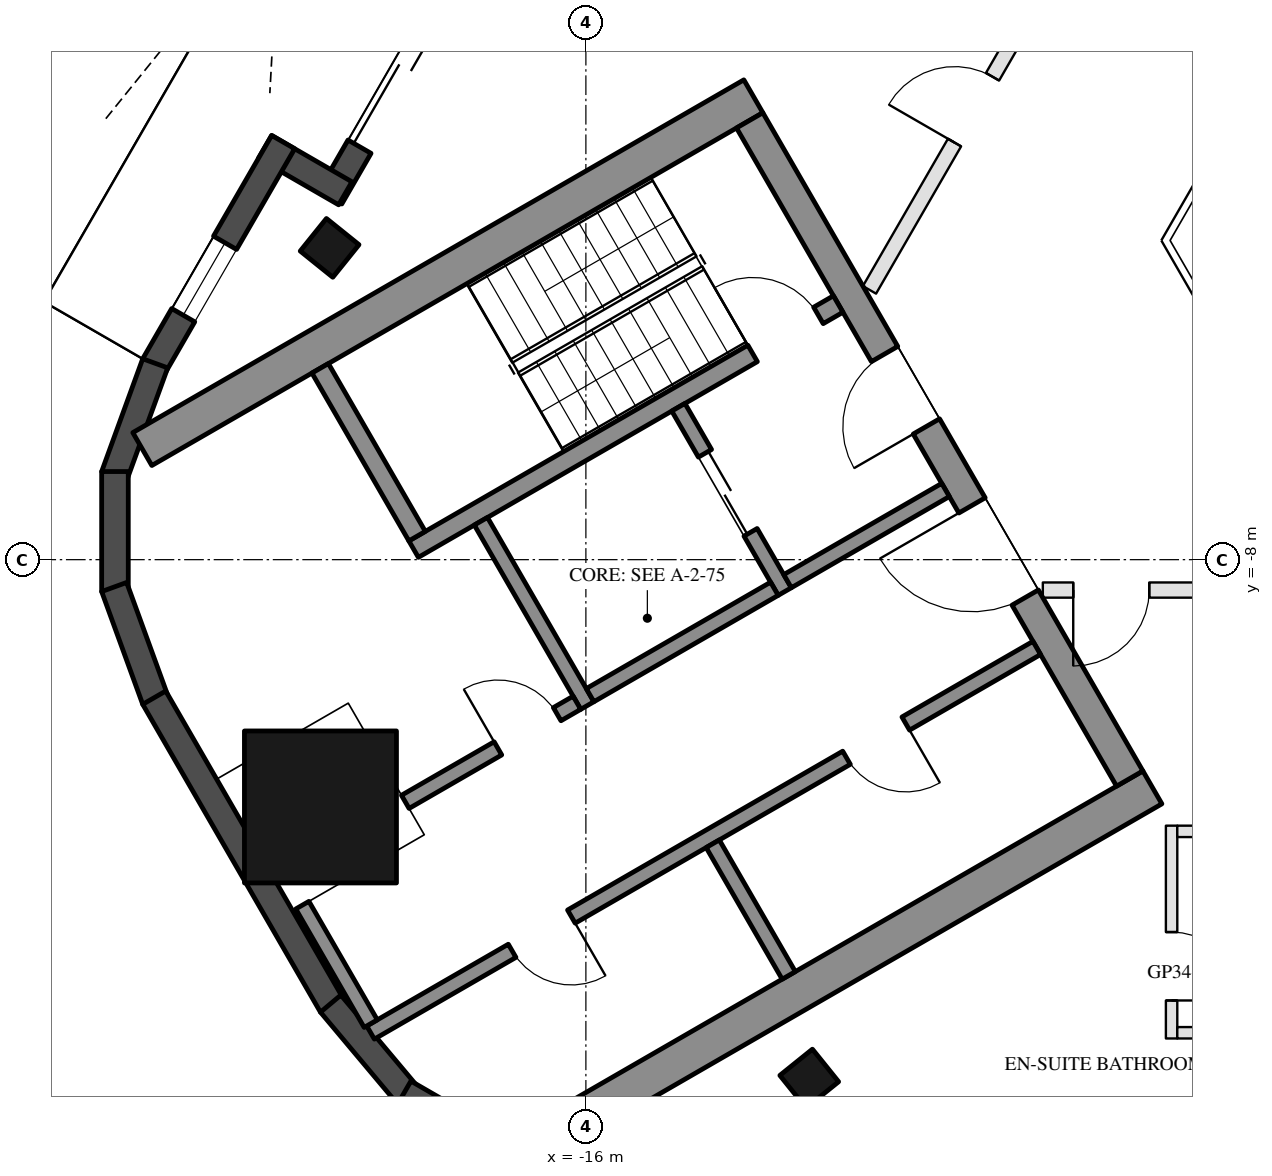
"""IFC4 building model, lengths in metres.
Left out: names, types, materials, properties, quantities, classifications, styles, units other than length and angle.
Written with IfcOpenShell. Run it as: python <this file> out.ifc"""

import sys

from ifc_helpers import new_model, si_unit, direction, frame, frame_2d, origin, origin_2d, place, context, subcontext, project, spatial, rectangle, hollow_rectangle, extrude, boolean, halfspace, element, fill, save


model = new_model("IFC4")
c1 = context("Model", 3, precision=1e-05, world=origin(), true_north=direction((0.0, 1.0)))
c2 = subcontext(c1, "Body", "Model", "MODEL_VIEW")
j1 = project(units=[si_unit("LENGTHUNIT", "METRE"), si_unit("PLANEANGLEUNIT", "RADIAN")], contexts=[c1])
p1 = place(None, origin())
s1 = spatial("IfcSite", under=j1, at=p1, CompositionType="ELEMENT")
p2 = place(p1, origin())
s2 = spatial("IfcBuilding", under=s1, at=p2, CompositionType="ELEMENT")
p3 = place(p2, frame((0.0, 0.0, 320.7)))
s3 = spatial("IfcBuildingStorey", under=s2, at=p3, CompositionType="ELEMENT", Elevation=320.7)
for number, where, z_axis, x_axis in (
    (1, (-13.061, -14.827, 0.0), (0.121, 0.15, 0.981), (-0.993, 0.009, 0.121)),
    (2, (-19.372, -3.898, 0.0), (0.191, 0.03, 0.981), (-0.488, -0.864, 0.121)),
):
    element("IfcColumn", number, at=place(p3, frame(where, z_axis=z_axis, x_axis=x_axis)), inside=s3, PredefinedType="COLUMN", context=c2, shape_type="SweptSolid", body=[
        boolean("DIFFERENCE", boolean("DIFFERENCE", extrude(hollow_rectangle(XDim=0.55, YDim=0.55, WallThickness=0.025, at=origin_2d()), origin(), (0.0, 0.0, 1.0), 3.771), halfspace(frame((0.0, 0.0, 0.04), z_axis=(0.0, 0.0, 1.0), x_axis=(1.0, 0.0, 0.0)), True)), halfspace(frame((0.0, 0.0, 3.731), z_axis=(0.0, 0.0, 1.0), x_axis=(1.0, 0.0, 0.0)), False)),
    ])
p4 = place(p3, frame((-19.492, -11.254, 0.0), z_axis=(0.190406849863, 0.109944185114, 0.975529347424), x_axis=(-0.500043453909, 0.866000314205, 0.0)))
e3 = element("IfcColumn", 3, at=p4, inside=s3, PredefinedType="COLUMN", context=c2, shape_type="SweptSolid", body=[
    boolean("DIFFERENCE", boolean("DIFFERENCE", extrude(hollow_rectangle(XDim=2.0, YDim=2.0, WallThickness=0.05, at=origin_2d()), origin(), (0.0, 0.0, 1.0), 3.793), halfspace(frame((0.0, 0.0, 0.113), z_axis=(0.0, 0.0, 1.0), x_axis=(1.0, 0.0, 0.0)), True)), halfspace(frame((0.0, 0.0, 3.679), z_axis=(0.0, 0.0, 1.0), x_axis=(1.0, 0.0, 0.0)), False)),
])
p5 = place(p3, frame((-16.678, 1.418, 0.0), z_axis=(0.0, 0.0, 1.0), x_axis=(-0.499996591357, -0.866027371756, 0.0)))
e4 = element("IfcWall", 4, at=p5, inside=s3, PredefinedType="SOLIDWALL", context=c2, shape_type="SweptSolid", body=[
    extrude(rectangle(XDim=5.371, YDim=0.35, at=frame_2d((2.685, 0.0))), origin(), (0.0, 0.0, 1.0), 3.55),
])
p6 = place(p5, frame((2.201, 0.0, 0.0)))
e5 = element("IfcOpeningElement", 5, at=p6, cuts=e4, PredefinedType="OPENING", context=c2, shape_type="SweptSolid", body=[
    extrude(rectangle(XDim=2.4, YDim=2.4, at=frame_2d((1.2, 1.2))), frame((0.0, 0.185, 0.0), z_axis=(0.0, -1.0, 0.0), x_axis=(1.0, 0.0, 0.0)), (0.0, 0.0, 1.0), 0.37),
])
p7 = place(p5, frame((0.77, 0.0, 0.3)))
e6 = element("IfcOpeningElement", 6, at=p7, cuts=e4, PredefinedType="OPENING", context=c2, shape_type="SweptSolid", body=[
    extrude(rectangle(XDim=1.1, YDim=2.65, at=frame_2d((0.55, 1.325))), frame((0.0, 0.185, 0.0), z_axis=(0.0, -1.0, 0.0), x_axis=(1.0, 0.0, 0.0)), (0.0, 0.0, 1.0), 0.37),
])
p8 = place(p3, frame((-19.165, -3.18, 0.0), z_axis=(0.0, 0.0, 1.0), x_axis=(-0.866005645448, 0.500034220881, 0.0)))
e7 = element("IfcWall", 7, at=p8, inside=s3, PredefinedType="SOLIDWALL", context=c2, shape_type="SweptSolid", body=[
    extrude(rectangle(XDim=1.22, YDim=0.35, at=frame_2d((0.61, 0.0))), origin(), (0.0, 0.0, 1.0), 3.55),
])
p9 = place(p3, frame((-19.982, -2.506, 0.0), z_axis=(0.0, 0.0, 1.0), x_axis=(-0.500054617923, -0.865993867816, 0.0)))
e8 = element("IfcWall", 8, at=p9, inside=s3, PredefinedType="SOLIDWALL", context=c2, shape_type="SweptSolid", body=[
    extrude(rectangle(XDim=3.393, YDim=0.35, at=frame_2d((1.697, 0.0))), origin(), (0.0, 0.0, 1.0), 3.55),
])
p10 = place(p9, frame((1.53, 0.0, 0.3)))
e9 = element("IfcOpeningElement", 9, at=p10, cuts=e8, PredefinedType="OPENING", context=c2, shape_type="SweptSolid", body=[
    extrude(rectangle(XDim=1.1, YDim=2.65, at=frame_2d((0.55, 1.325))), frame((0.0, 0.185, 0.0), z_axis=(0.0, -1.0, 0.0), x_axis=(1.0, 0.0, 0.0)), (0.0, 0.0, 1.0), 0.37),
])
for number, where, z_axis, x_axis in (
    (10, (-21.666, -5.417, 0.0), (0.0, 0.0, 1.0), (-0.342, -0.94, 0.0)),
    (11, (-22.196, -6.841, 0.0), (0.0, 0.0, 1.0), (0.0, -1.0, 0.0)),
    (12, (-22.206, -8.36, 0.0), (0.0, 0.0, 1.0), (0.342, -0.94, 0.0)),
):
    element("IfcWall", number, at=place(p3, frame(where, z_axis=z_axis, x_axis=x_axis)), inside=s3, PredefinedType="SOLIDWALL", context=c2, shape_type="SweptSolid", body=[
        extrude(rectangle(XDim=1.579, YDim=0.35, at=frame_2d((0.79, 0.0))), origin(), (0.0, 0.0, 1.0), 3.55),
    ])
p11 = place(p3, frame((-21.679, -9.816, 0.0), z_axis=(0.0, 0.0, 1.0), x_axis=(0.500023656998, -0.86601174498, 0.0)))
e13 = element("IfcWall", 13, at=p11, inside=s3, PredefinedType="SOLIDWALL", context=c2, shape_type="SweptSolid", body=[
    extrude(rectangle(XDim=4.677, YDim=0.35, at=frame_2d((2.339, 0.0))), origin(), (0.0, 0.0, 1.0), 3.55),
])
for number, where, z_axis, x_axis in (
    (14, (-19.358, -13.842, 0.0), (0.0, 0.0, 1.0), (0.643, -0.766, 0.0)),
    (15, (-18.389, -15.012, 0.0), (0.0, 0.0, 1.0), (0.866, -0.5, 0.0)),
):
    element("IfcWall", number, at=place(p3, frame(where, z_axis=z_axis, x_axis=x_axis)), inside=s3, PredefinedType="SOLIDWALL", context=c2, shape_type="SweptSolid", body=[
        extrude(rectangle(XDim=1.579, YDim=0.35, at=frame_2d((0.79, 0.0))), origin(), (0.0, 0.0, 1.0), 3.55),
    ])
for number, where, z_axis, x_axis in (
    (16, (-13.797, -1.903, 0.0), (0.0, 0.0, 1.0), (-0.866, -0.5, 0.0)),
    (17, (-8.547, -10.997, 0.0), (0.0, 0.0, 1.0), (-0.866, -0.5, 0.0)),
):
    element("IfcWall", number, at=place(p3, frame(where, z_axis=z_axis, x_axis=x_axis)), inside=s3, PredefinedType="SHEAR", context=c2, shape_type="SweptSolid", body=[
        extrude(rectangle(XDim=9.283, YDim=0.5, at=frame_2d((4.641, 0.0))), origin(), (0.0, 0.0, 1.0), 3.5),
    ])
p12 = place(p3, frame((-13.845, -2.22, 0.0), z_axis=(0.0, 0.0, 1.0), x_axis=(0.500004234368, -0.866022959057, 0.0)))
e18 = element("IfcWall", 18, at=p12, inside=s3, PredefinedType="SHEAR", context=c2, shape_type="SweptSolid", body=[
    extrude(rectangle(XDim=10.0, YDim=0.4, at=frame_2d((5.0, 0.0))), origin(), (0.0, 0.0, 1.0), 3.5),
])
p13 = place(p12, frame((3.55, 0.0, 0.0)))
e19 = element("IfcOpeningElement", 19, at=p13, cuts=e18, PredefinedType="OPENING", context=c2, shape_type="SweptSolid", body=[
    extrude(rectangle(XDim=1.1, YDim=2.1, at=frame_2d((0.55, 1.05))), frame((0.0, 0.21, 0.0), z_axis=(0.0, -1.0, 0.0), x_axis=(1.0, 0.0, 0.0)), (0.0, 0.0, 1.0), 0.42),
])
p14 = place(p12, frame((5.85, 0.0, 0.0)))
e20 = element("IfcOpeningElement", 20, at=p14, cuts=e18, PredefinedType="OPENING", context=c2, shape_type="SweptSolid", body=[
    extrude(rectangle(XDim=1.4, YDim=2.1, at=frame_2d((0.7, 1.05))), frame((0.0, 0.21, 0.0), z_axis=(0.0, -1.0, 0.0), x_axis=(1.0, 0.0, 0.0)), (0.0, 0.0, 1.0), 0.42),
])
p15 = place(p3, frame((-12.681, -4.636, 0.0), z_axis=(0.0, 0.0, 1.0), x_axis=(-0.866021702275, -0.500006411147, 0.0)))
e21 = element("IfcWall", 21, at=p15, inside=s3, PredefinedType="SHEAR", context=c2, shape_type="SweptSolid", body=[
    extrude(rectangle(XDim=6.45, YDim=0.25, at=frame_2d((3.225, 0.0))), origin(), (0.0, 0.0, 1.0), 3.5),
])
p16 = place(p15, frame((0.3, 0.0, 0.0)))
e22 = element("IfcOpeningElement", 22, at=p16, cuts=e21, PredefinedType="OPENING", context=c2, shape_type="SweptSolid", body=[
    extrude(rectangle(XDim=1.0, YDim=2.1, at=frame_2d((0.5, 1.05))), frame((0.0, 0.135, 0.0), z_axis=(0.0, -1.0, 0.0), x_axis=(1.0, 0.0, 0.0)), (0.0, 0.0, 1.0), 0.27),
])
p17 = place(p3, frame((-19.496, -5.482, 0.0), z_axis=(0.0, 0.0, 1.0), x_axis=(0.499990435942, -0.866030925526, 0.0)))
e23 = element("IfcWall", 23, at=p17, inside=s3, PredefinedType="SHEAR", context=c2, shape_type="SweptSolid", body=[
    extrude(rectangle(XDim=2.55, YDim=0.25, at=frame_2d((1.275, 0.0))), origin(), (0.0, 0.0, 1.0), 3.5),
])
p18 = place(p3, frame((-17.381, -7.495, 0.0), z_axis=(0.0, 0.0, 1.0), x_axis=(0.500011755427, -0.866018616679, 0.0)))
e24 = element("IfcWall", 24, at=p18, inside=s3, PredefinedType="SHEAR", context=c2, shape_type="SweptSolid", body=[
    extrude(rectangle(XDim=2.8, YDim=0.2, at=frame_2d((1.4, 0.0))), origin(), (0.0, 0.0, 1.0), 3.5),
])
p19 = place(p3, frame((-14.783, -5.995, 0.0), z_axis=(0.0, 0.0, 1.0), x_axis=(0.49994636267, -0.866056369097, 0.0)))
e25 = element("IfcWall", 25, at=p19, inside=s3, PredefinedType="SHEAR", context=c2, shape_type="SweptSolid", body=[
    extrude(rectangle(XDim=2.8, YDim=0.2, at=frame_2d((1.4, 0.0))), origin(), (0.0, 0.0, 1.0), 3.5),
])
p20 = place(p19, frame((0.7, 0.0, 0.0)))
e26 = element("IfcOpeningElement", 26, at=p20, cuts=e25, PredefinedType="OPENING", context=c2, shape_type="SweptSolid", body=[
    extrude(rectangle(XDim=1.2, YDim=2.1, at=frame_2d((0.6, 1.05))), frame((0.0, 0.11, 0.0), z_axis=(0.0, -1.0, 0.0), x_axis=(1.0, 0.0, 0.0)), (0.0, 0.0, 1.0), 0.22),
])
p21 = place(p3, frame((-13.52, -8.383, 0.0), z_axis=(0.0, 0.0, 1.0), x_axis=(-0.866034573852, -0.49998411664, 0.0)))
e27 = element("IfcWall", 27, at=p21, inside=s3, PredefinedType="SHEAR", context=c2, shape_type="SweptSolid", body=[
    extrude(rectangle(XDim=2.8, YDim=0.2, at=frame_2d((1.4, 0.0))), origin(), (0.0, 0.0, 1.0), 3.5),
])
p22 = place(p3, frame((-11.268, -7.083, 0.0), z_axis=(0.0, 0.0, 1.0), x_axis=(-0.866050077142, -0.499957262057, 0.0)))
e28 = element("IfcWall", 28, at=p22, inside=s3, PredefinedType="SHEAR", context=c2, shape_type="SweptSolid", body=[
    extrude(rectangle(XDim=2.4, YDim=0.2, at=frame_2d((1.2, 0.0))), origin(), (0.0, 0.0, 1.0), 3.5),
])
p23 = place(p3, frame((-10.068, -9.162, 0.0), z_axis=(0.0, 0.0, 1.0), x_axis=(-0.866030125237, -0.499991822116, 0.0)))
e29 = element("IfcWall", 29, at=p23, inside=s3, PredefinedType="SHEAR", context=c2, shape_type="SweptSolid", body=[
    extrude(rectangle(XDim=10.121, YDim=0.2, at=frame_2d((5.061, 0.0))), origin(), (0.0, 0.0, 1.0), 3.5),
])
p24 = place(p23, frame((1.99, 0.0, 0.0)))
e30 = element("IfcOpeningElement", 30, at=p24, cuts=e29, PredefinedType="OPENING", context=c2, shape_type="SweptSolid", body=[
    extrude(rectangle(XDim=0.9, YDim=2.1, at=frame_2d((0.45, 1.05))), frame((0.0, 0.11, 0.0), z_axis=(0.0, -1.0, 0.0), x_axis=(1.0, 0.0, 0.0)), (0.0, 0.0, 1.0), 0.22),
])
p25 = place(p23, frame((7.07, 0.0, 0.0)))
e31 = element("IfcOpeningElement", 31, at=p25, cuts=e29, PredefinedType="OPENING", context=c2, shape_type="SweptSolid", body=[
    extrude(rectangle(XDim=0.9, YDim=2.1, at=frame_2d((0.45, 1.05))), frame((0.0, 0.11, 0.0), z_axis=(0.0, -1.0, 0.0), x_axis=(1.0, 0.0, 0.0)), (0.0, 0.0, 1.0), 0.22),
])
p26 = place(p3, frame((-19.73, -12.546, 0.0), z_axis=(0.0, 0.0, 1.0), x_axis=(0.500004188491, -0.866022985545, 0.0)))
e32 = element("IfcWall", 32, at=p26, inside=s3, PredefinedType="SHEAR", context=c2, shape_type="SweptSolid", body=[
    extrude(rectangle(XDim=1.8, YDim=0.2, at=frame_2d((0.9, 0.0))), origin(), (0.0, 0.0, 1.0), 3.5),
])
p27 = place(p3, frame((-16.118, -9.883, 0.0), z_axis=(0.0, 0.0, 1.0), x_axis=(-0.866045268016, -0.499965592563, 0.0)))
e33 = element("IfcWall", 33, at=p27, inside=s3, PredefinedType="SHEAR", context=c2, shape_type="SweptSolid", body=[
    extrude(rectangle(XDim=2.608, YDim=0.2, at=frame_2d((1.304, 0.0))), origin(), (0.0, 0.0, 1.0), 3.5),
])
p28 = place(p27, frame((0.3, 0.0, 0.0)))
e34 = element("IfcOpeningElement", 34, at=p28, cuts=e33, PredefinedType="OPENING", context=c2, shape_type="SweptSolid", body=[
    extrude(rectangle(XDim=0.9, YDim=2.1, at=frame_2d((0.45, 1.05))), frame((0.0, 0.11, 0.0), z_axis=(0.0, -1.0, 0.0), x_axis=(1.0, 0.0, 0.0)), (0.0, 0.0, 1.0), 0.22),
])
p29 = place(p3, frame((-14.331, -11.738, 0.0), z_axis=(0.0, 0.0, 1.0), x_axis=(0.499972520799, -0.866041268327, 0.0)))
e35 = element("IfcWall", 35, at=p29, inside=s3, PredefinedType="SHEAR", context=c2, shape_type="SweptSolid", body=[
    extrude(rectangle(XDim=2.0, YDim=0.2, at=frame_2d((1.0, 0.0))), origin(), (0.0, 0.0, 1.0), 3.5),
])
p30 = place(p3, frame((-6.194, -8.4, 0.0), z_axis=(0.0, 0.0, 1.0), x_axis=(-1.0, 0.0, 0.0)))
e36 = element("IfcWall", 36, at=p30, inside=s3, PredefinedType="PARTITIONING", context=c2, shape_type="SweptSolid", body=[
    extrude(rectangle(XDim=3.794, YDim=0.2, at=frame_2d((1.897, 0.0))), origin(), (0.0, 0.0, 1.0), 3.15),
])
p31 = place(p30, frame((2.394, 0.0, 0.0)))
e37 = element("IfcOpeningElement", 37, at=p31, cuts=e36, PredefinedType="OPENING", context=c2, shape_type="SweptSolid", body=[
    extrude(rectangle(XDim=1.0, YDim=2.1, at=frame_2d((0.5, 1.05))), frame((0.0, 0.11, 0.0), z_axis=(0.0, -1.0, 0.0), x_axis=(1.0, 0.0, 0.0)), (0.0, 0.0, 1.0), 0.22),
])
p32 = place(p3, frame((-8.294, -11.5, 0.0), z_axis=(0.0, 0.0, 1.0), x_axis=(0.0, -1.0, 0.0)))
e38 = element("IfcWall", 38, at=p32, inside=s3, PredefinedType="PARTITIONING", context=c2, shape_type="SweptSolid", body=[
    extrude(rectangle(XDim=2.8, YDim=0.15, at=frame_2d((1.4, 0.0))), origin(), (0.0, 0.0, 1.0), 3.1),
])
p33 = place(p32, frame((1.4, 0.0, 0.0)))
e39 = element("IfcOpeningElement", 39, at=p33, cuts=e38, PredefinedType="OPENING", context=c2, shape_type="SweptSolid", body=[
    extrude(rectangle(XDim=0.9, YDim=2.1, at=frame_2d((0.45, 1.05))), frame((0.0, 0.085, 0.0), z_axis=(0.0, -1.0, 0.0), x_axis=(1.0, 0.0, 0.0)), (0.0, 0.0, 1.0), 0.17),
])
p34 = place(p3, frame((-8.219, -14.225, 0.0), z_axis=(0.0, 0.0, 1.0), x_axis=(1.0, 0.0, 0.0)))
e40 = element("IfcWall", 40, at=p34, inside=s3, PredefinedType="PARTITIONING", context=c2, shape_type="SweptSolid", body=[
    extrude(rectangle(XDim=1.685, YDim=0.15, at=frame_2d((0.842, 0.0))), origin(), (0.0, 0.0, 1.0), 3.1),
])
p35 = place(p3, frame((-8.219, -11.575, 0.0), z_axis=(0.0, 0.0, 1.0), x_axis=(1.0, 0.0, 0.0)))
e41 = element("IfcWall", 41, at=p35, inside=s3, PredefinedType="PARTITIONING", context=c2, shape_type="SweptSolid", body=[
    extrude(rectangle(XDim=1.839, YDim=0.15, at=frame_2d((0.92, 0.0))), origin(), (0.0, 0.0, 1.0), 3.15),
])
p36 = place(p3, frame((-12.269, -4.45, 0.0), z_axis=(0.0, 0.0, 1.0), x_axis=(0.500034087201, 0.866005722635, 0.0)))
e42 = element("IfcWall", 42, at=p36, inside=s3, PredefinedType="PARTITIONING", context=c2, shape_type="SweptSolid", body=[
    extrude(rectangle(XDim=5.696, YDim=0.2, at=frame_2d((2.848, 0.0))), origin(), (0.0, 0.0, 1.0), 3.15),
])
p37 = place(p36, frame((2.238, 0.0, 0.0)))
e43 = element("IfcOpeningElement", 43, at=p37, cuts=e42, PredefinedType="OPENING", context=c2, shape_type="SweptSolid", body=[
    extrude(rectangle(XDim=1.0, YDim=2.1, at=frame_2d((0.5, 1.05))), frame((0.0, 0.11, 0.0), z_axis=(0.0, -1.0, 0.0), x_axis=(1.0, 0.0, 0.0)), (0.0, 0.0, 1.0), 0.22),
])
p38 = place(p6, frame((2.4, 0.0, 0.0), z_axis=(0.0, 0.0, 1.0), x_axis=(-1.0, 0.0, 0.0)))
e44 = element("IfcDoor", 44, at=p38, inside=s3, OperationType="SLIDING_TO_LEFT", PredefinedType="DOOR", context=c2, shape_type="SweptSolid", body=[
    extrude(rectangle(XDim=2.4, YDim=2.4, at=frame_2d((1.2, 1.2))), frame((0.0, 0.025, 0.0), z_axis=(0.0, -1.0, 0.0), x_axis=(1.0, 0.0, 0.0)), (0.0, 0.0, 1.0), 0.05),
])
fill(e5, e44)
p39 = place(p10, origin())
e45 = element("IfcWindow", 45, at=p39, inside=s3, PartitioningType="SINGLE_PANEL", PredefinedType="WINDOW", context=c2, shape_type="SweptSolid", body=[
    extrude(rectangle(XDim=1.1, YDim=2.65, at=frame_2d((0.55, 1.325))), frame((0.0, 0.03, 0.0), z_axis=(0.0, -1.0, 0.0), x_axis=(1.0, 0.0, 0.0)), (0.0, 0.0, 1.0), 0.06),
])
fill(e9, e45)
p40 = place(p20, origin())
e46 = element("IfcDoor", 46, at=p40, inside=s3, OperationType="DOUBLE_DOOR_SLIDING", PredefinedType="DOOR", context=c2, shape_type="SweptSolid", body=[
    extrude(rectangle(XDim=1.2, YDim=2.1, at=frame_2d((0.6, 1.05))), frame((0.0, 0.025, 0.0), z_axis=(0.0, -1.0, 0.0), x_axis=(1.0, 0.0, 0.0)), (0.0, 0.0, 1.0), 0.05),
])
fill(e26, e46)
p41 = place(p24, origin())
e47 = element("IfcDoor", 47, at=p41, inside=s3, OperationType="SINGLE_SWING_LEFT", PredefinedType="DOOR", context=c2, shape_type="SweptSolid", body=[
    extrude(rectangle(XDim=0.9, YDim=2.1, at=frame_2d((0.45, 1.05))), frame((0.0, 0.025, 0.0), z_axis=(0.0, -1.0, 0.0), x_axis=(1.0, 0.0, 0.0)), (0.0, 0.0, 1.0), 0.05),
])
fill(e30, e47)
p42 = place(p25, origin())
e48 = element("IfcDoor", 48, at=p42, inside=s3, OperationType="SINGLE_SWING_LEFT", PredefinedType="DOOR", context=c2, shape_type="SweptSolid", body=[
    extrude(rectangle(XDim=0.9, YDim=2.1, at=frame_2d((0.45, 1.05))), frame((0.0, 0.025, 0.0), z_axis=(0.0, -1.0, 0.0), x_axis=(1.0, 0.0, 0.0)), (0.0, 0.0, 1.0), 0.05),
])
fill(e31, e48)
p43 = place(p28, frame((0.9, 0.0, 0.0), z_axis=(0.0, 0.0, 1.0), x_axis=(-1.0, 0.0, 0.0)))
e49 = element("IfcDoor", 49, at=p43, inside=s3, OperationType="SINGLE_SWING_LEFT", PredefinedType="DOOR", context=c2, shape_type="SweptSolid", body=[
    extrude(rectangle(XDim=0.9, YDim=2.1, at=frame_2d((0.45, 1.05))), frame((0.0, 0.025, 0.0), z_axis=(0.0, -1.0, 0.0), x_axis=(1.0, 0.0, 0.0)), (0.0, 0.0, 1.0), 0.05),
])
fill(e34, e49)
p44 = place(p13, frame((1.1, 0.0, 0.0), z_axis=(0.0, 0.0, 1.0), x_axis=(-1.0, 0.0, 0.0)))
e50 = element("IfcDoor", 50, at=p44, inside=s3, OperationType="SINGLE_SWING_LEFT", PredefinedType="DOOR", context=c2, shape_type="SweptSolid", body=[
    extrude(rectangle(XDim=1.1, YDim=2.1, at=frame_2d((0.55, 1.05))), frame((0.0, 0.025, 0.0), z_axis=(0.0, -1.0, 0.0), x_axis=(1.0, 0.0, 0.0)), (0.0, 0.0, 1.0), 0.05),
])
fill(e19, e50)
p45 = place(p14, frame((1.4, 0.0, 0.0), z_axis=(0.0, 0.0, 1.0), x_axis=(-1.0, 0.0, 0.0)))
e51 = element("IfcDoor", 51, at=p45, inside=s3, OperationType="DOUBLE_DOOR_SINGLE_SWING", PredefinedType="DOOR", context=c2, shape_type="SweptSolid", body=[
    extrude(rectangle(XDim=1.4, YDim=2.1, at=frame_2d((0.7, 1.05))), frame((0.0, 0.025, 0.0), z_axis=(0.0, -1.0, 0.0), x_axis=(1.0, 0.0, 0.0)), (0.0, 0.0, 1.0), 0.05),
])
fill(e20, e51)
p46 = place(p16, frame((1.0, 0.0, 0.0), z_axis=(0.0, 0.0, 1.0), x_axis=(-1.0, 0.0, 0.0)))
e52 = element("IfcDoor", 52, at=p46, inside=s3, OperationType="SINGLE_SWING_LEFT", PredefinedType="DOOR", context=c2, shape_type="SweptSolid", body=[
    extrude(rectangle(XDim=1.0, YDim=2.1, at=frame_2d((0.5, 1.05))), frame((0.0, 0.025, 0.0), z_axis=(0.0, -1.0, 0.0), x_axis=(1.0, 0.0, 0.0)), (0.0, 0.0, 1.0), 0.05),
])
fill(e22, e52)
p47 = place(p33, origin())
e53 = element("IfcDoor", 53, at=p47, inside=s3, OperationType="SINGLE_SWING_RIGHT", PredefinedType="DOOR", context=c2, shape_type="SweptSolid", body=[
    extrude(rectangle(XDim=0.9, YDim=2.1, at=frame_2d((0.45, 1.05))), frame((0.0, 0.025, 0.0), z_axis=(0.0, -1.0, 0.0), x_axis=(1.0, 0.0, 0.0)), (0.0, 0.0, 1.0), 0.05),
])
fill(e39, e53)
p48 = place(p31, origin())
e54 = element("IfcDoor", 54, at=p48, inside=s3, OperationType="SINGLE_SWING_RIGHT", PredefinedType="DOOR", context=c2, shape_type="SweptSolid", body=[
    extrude(rectangle(XDim=1.0, YDim=2.1, at=frame_2d((0.5, 1.05))), frame((0.0, 0.025, 0.0), z_axis=(0.0, -1.0, 0.0), x_axis=(1.0, 0.0, 0.0)), (0.0, 0.0, 1.0), 0.05),
])
fill(e37, e54)
p49 = place(p37, origin())
e55 = element("IfcDoor", 55, at=p49, inside=s3, OperationType="SINGLE_SWING_LEFT", PredefinedType="DOOR", context=c2, shape_type="SweptSolid", body=[
    extrude(rectangle(XDim=1.0, YDim=2.1, at=frame_2d((0.5, 1.05))), frame((0.0, 0.025, 0.0), z_axis=(0.0, -1.0, 0.0), x_axis=(1.0, 0.0, 0.0)), (0.0, 0.0, 1.0), 0.05),
])
fill(e43, e55)
save(model, sys.argv[1])
